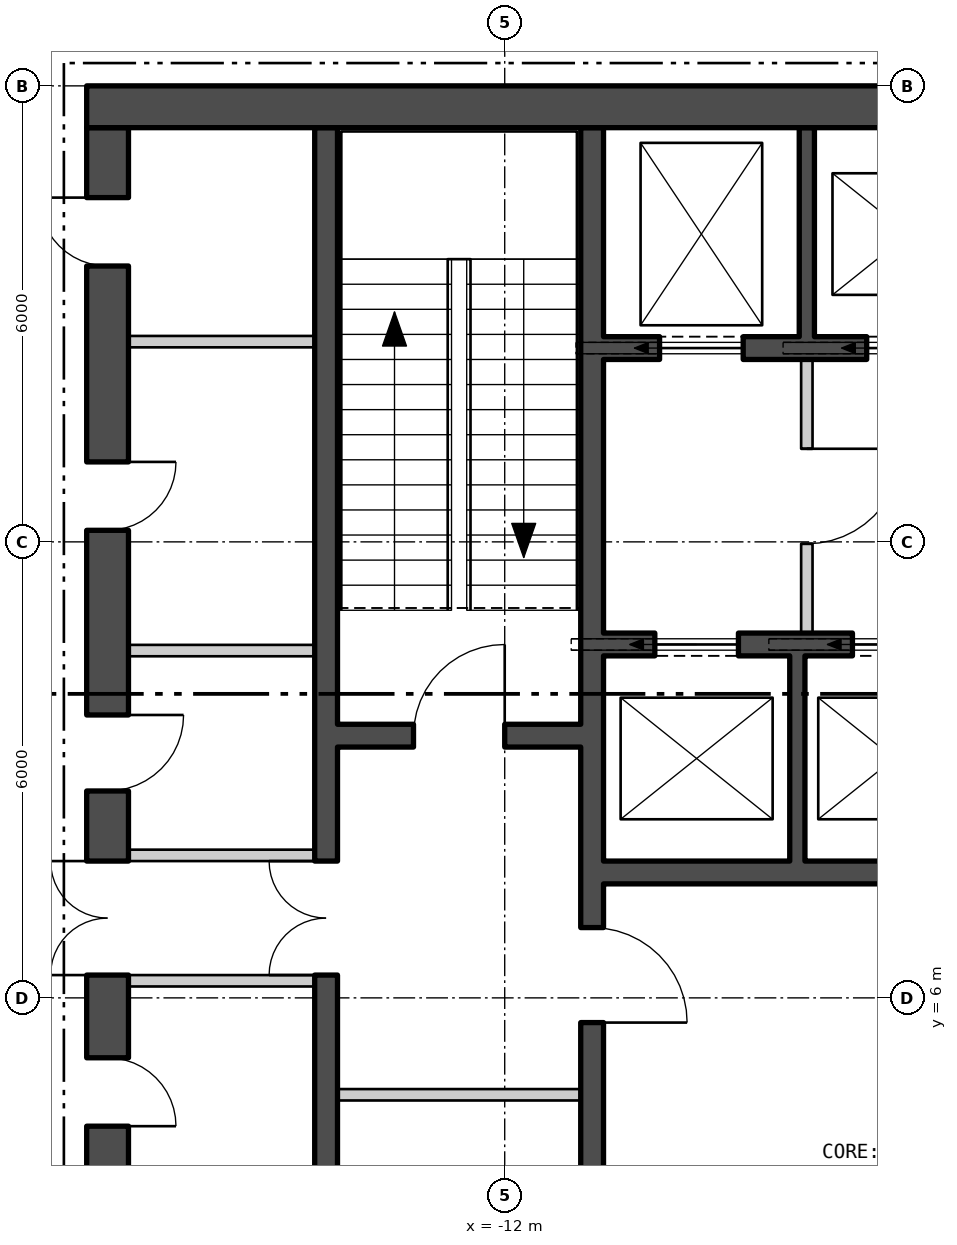
"""IFC4 building model, lengths in metres.
Left out: names, types, materials, properties, quantities, classifications, styles, units other than length and angle.
Written with IfcOpenShell. Run it as: python <this file> out.ifc"""

import sys

from ifc_helpers import new_model, si_unit, direction, frame, frame_2d, origin, place, context, subcontext, project, spatial, polyline, rectangle, outline, extrude, element, fill, save


model = new_model("IFC4")
c1 = context("Model", 3, precision=1e-05, world=origin(), true_north=direction((0.0, 1.0)))
c2 = subcontext(c1, "Body", "Model", "MODEL_VIEW")
j1 = project(units=[si_unit("LENGTHUNIT", "METRE"), si_unit("PLANEANGLEUNIT", "RADIAN")], contexts=[c1])
p1 = place(None, origin())
s1 = spatial("IfcSite", under=j1, at=p1, CompositionType="ELEMENT")
p2 = place(p1, origin())
s2 = spatial("IfcBuilding", under=s1, at=p2, CompositionType="ELEMENT")
p3 = place(p2, frame((0.0, 0.0, 124.8)))
s3 = spatial("IfcBuildingStorey", under=s2, at=p3, CompositionType="ELEMENT", Elevation=124.8)
p4 = place(p3, frame((-27.45, 12.042, -0.18), z_axis=(0.0, 0.0, 1.0), x_axis=(0.500000711659, -0.866024992908, 0.0)))
e1 = element("IfcWall", 1, at=p4, inside=s3, PredefinedType="SOLIDWALL", context=c2, shape_type="SweptSolid", body=[
    extrude(outline(polyline([(-0.13, -0.225), (45.87, -0.225), (45.61, 0.225), (0.13, 0.225), (-0.13, -0.225)])), origin(), (0.0, 0.0, 1.0), 4.28),
])
p5 = place(p4, frame((1.424, 0.0, 1.08)))
e2 = element("IfcOpeningElement", 2, at=p5, cuts=e1, PredefinedType="OPENING", context=c2, shape_type="SweptSolid", body=[
    extrude(rectangle(XDim=2.4, YDim=2.6, at=frame_2d((1.2, 1.3))), frame((0.0, 0.235, 0.0), z_axis=(0.0, -1.0, 0.0), x_axis=(1.0, 0.0, 0.0)), (0.0, 0.0, 1.0), 0.47),
])
p6 = place(p4, frame((5.893, 0.0, 1.08)))
e3 = element("IfcOpeningElement", 3, at=p6, cuts=e1, PredefinedType="OPENING", context=c2, shape_type="SweptSolid", body=[
    extrude(rectangle(XDim=2.4, YDim=2.6, at=frame_2d((1.2, 1.3))), frame((0.0, 0.235, 0.0), z_axis=(0.0, -1.0, 0.0), x_axis=(1.0, 0.0, 0.0)), (0.0, 0.0, 1.0), 0.47),
])
p7 = place(p4, frame((10.401, 0.0, 1.08)))
e4 = element("IfcOpeningElement", 4, at=p7, cuts=e1, PredefinedType="OPENING", context=c2, shape_type="SweptSolid", body=[
    extrude(rectangle(XDim=2.4, YDim=2.6, at=frame_2d((1.2, 1.3))), frame((0.0, 0.235, 0.0), z_axis=(0.0, -1.0, 0.0), x_axis=(1.0, 0.0, 0.0)), (0.0, 0.0, 1.0), 0.47),
])
p8 = place(p4, frame((19.416, 0.0, 1.08)))
e5 = element("IfcOpeningElement", 5, at=p8, cuts=e1, PredefinedType="OPENING", context=c2, shape_type="SweptSolid", body=[
    extrude(rectangle(XDim=2.4, YDim=2.6, at=frame_2d((1.2, 1.3))), frame((0.0, 0.235, 0.0), z_axis=(0.0, -1.0, 0.0), x_axis=(1.0, 0.0, 0.0)), (0.0, 0.0, 1.0), 0.47),
])
p9 = place(p4, frame((23.924, 0.0, 1.08)))
e6 = element("IfcOpeningElement", 6, at=p9, cuts=e1, PredefinedType="OPENING", context=c2, shape_type="SweptSolid", body=[
    extrude(rectangle(XDim=2.4, YDim=2.6, at=frame_2d((1.2, 1.3))), frame((0.0, 0.235, 0.0), z_axis=(0.0, -1.0, 0.0), x_axis=(1.0, 0.0, 0.0)), (0.0, 0.0, 1.0), 0.47),
])
p10 = place(p4, frame((28.431, 0.0, 1.08)))
e7 = element("IfcOpeningElement", 7, at=p10, cuts=e1, PredefinedType="OPENING", context=c2, shape_type="SweptSolid", body=[
    extrude(rectangle(XDim=2.4, YDim=2.6, at=frame_2d((1.2, 1.3))), frame((0.0, 0.235, 0.0), z_axis=(0.0, -1.0, 0.0), x_axis=(1.0, 0.0, 0.0)), (0.0, 0.0, 1.0), 0.47),
])
p11 = place(p4, frame((32.939, 0.0, 1.08)))
e8 = element("IfcOpeningElement", 8, at=p11, cuts=e1, PredefinedType="OPENING", context=c2, shape_type="SweptSolid", body=[
    extrude(rectangle(XDim=2.4, YDim=2.6, at=frame_2d((1.2, 1.3))), frame((0.0, 0.235, 0.0), z_axis=(0.0, -1.0, 0.0), x_axis=(1.0, 0.0, 0.0)), (0.0, 0.0, 1.0), 0.47),
])
p12 = place(p4, frame((37.447, 0.0, 1.08)))
e9 = element("IfcOpeningElement", 9, at=p12, cuts=e1, PredefinedType="OPENING", context=c2, shape_type="SweptSolid", body=[
    extrude(rectangle(XDim=2.4, YDim=2.6, at=frame_2d((1.2, 1.3))), frame((0.0, 0.235, 0.0), z_axis=(0.0, -1.0, 0.0), x_axis=(1.0, 0.0, 0.0)), (0.0, 0.0, 1.0), 0.47),
])
p13 = place(p4, frame((41.916, 0.0, 1.08)))
e10 = element("IfcOpeningElement", 10, at=p13, cuts=e1, PredefinedType="OPENING", context=c2, shape_type="SweptSolid", body=[
    extrude(rectangle(XDim=2.4, YDim=2.6, at=frame_2d((1.2, 1.3))), frame((0.0, 0.235, 0.0), z_axis=(0.0, -1.0, 0.0), x_axis=(1.0, 0.0, 0.0)), (0.0, 0.0, 1.0), 0.47),
])
p14 = place(p3, frame((-17.5, 17.725, 0.0), z_axis=(0.0, 0.0, 1.0), x_axis=(1.0, 0.0, 0.0)))
e11 = element("IfcWall", 11, at=p14, inside=s3, PredefinedType="SHEAR", context=c2, shape_type="SweptSolid", body=[
    extrude(rectangle(XDim=35.0, YDim=0.55, at=frame_2d((17.5, 0.0))), origin(), (0.0, 0.0, 1.0), 4.3),
])
p15 = place(p3, frame((-17.225, 0.55, 0.0), z_axis=(0.0, 0.0, 1.0), x_axis=(0.0, 1.0, 0.0)))
e12 = element("IfcWall", 12, at=p15, inside=s3, PredefinedType="SHEAR", context=c2, shape_type="SweptSolid", body=[
    extrude(rectangle(XDim=16.9, YDim=0.55, at=frame_2d((8.45, 0.0))), origin(), (0.0, 0.0, 1.0), 4.3),
])
p16 = place(p15, frame((5.75, 0.0, 0.0)))
e13 = element("IfcOpeningElement", 13, at=p16, cuts=e12, PredefinedType="OPENING", context=c2, shape_type="SweptSolid", body=[
    extrude(rectangle(XDim=1.5, YDim=2.1, at=frame_2d((0.75, 1.05))), frame((0.0, 0.285, 0.0), z_axis=(0.0, -1.0, 0.0), x_axis=(1.0, 0.0, 0.0)), (0.0, 0.0, 1.0), 0.57),
])
p17 = place(p15, frame((0.887, 0.0, 0.0)))
e14 = element("IfcOpeningElement", 14, at=p17, cuts=e12, PredefinedType="OPENING", context=c2, shape_type="SweptSolid", body=[
    extrude(rectangle(XDim=0.9, YDim=2.1, at=frame_2d((0.45, 1.05))), frame((0.0, 0.285, 0.0), z_axis=(0.0, -1.0, 0.0), x_axis=(1.0, 0.0, 0.0)), (0.0, 0.0, 1.0), 0.57),
])
p18 = place(p15, frame((3.762, 0.0, 0.0)))
e15 = element("IfcOpeningElement", 15, at=p18, cuts=e12, PredefinedType="OPENING", context=c2, shape_type="SweptSolid", body=[
    extrude(rectangle(XDim=0.9, YDim=2.1, at=frame_2d((0.45, 1.05))), frame((0.0, 0.285, 0.0), z_axis=(0.0, -1.0, 0.0), x_axis=(1.0, 0.0, 0.0)), (0.0, 0.0, 1.0), 0.57),
])
p19 = place(p15, frame((8.172, 0.0, 0.0)))
e16 = element("IfcOpeningElement", 16, at=p19, cuts=e12, PredefinedType="OPENING", context=c2, shape_type="SweptSolid", body=[
    extrude(rectangle(XDim=1.0, YDim=2.1, at=frame_2d((0.5, 1.05))), frame((0.0, 0.285, 0.0), z_axis=(0.0, -1.0, 0.0), x_axis=(1.0, 0.0, 0.0)), (0.0, 0.0, 1.0), 0.57),
])
p20 = place(p15, frame((11.602, 0.0, 0.0)))
e17 = element("IfcOpeningElement", 17, at=p20, cuts=e12, PredefinedType="OPENING", context=c2, shape_type="SweptSolid", body=[
    extrude(rectangle(XDim=0.9, YDim=2.1, at=frame_2d((0.45, 1.05))), frame((0.0, 0.285, 0.0), z_axis=(0.0, -1.0, 0.0), x_axis=(1.0, 0.0, 0.0)), (0.0, 0.0, 1.0), 0.57),
])
p21 = place(p15, frame((15.08, 0.0, 0.0)))
e18 = element("IfcOpeningElement", 18, at=p21, cuts=e12, PredefinedType="OPENING", context=c2, shape_type="SweptSolid", body=[
    extrude(rectangle(XDim=0.9, YDim=2.1, at=frame_2d((0.45, 1.05))), frame((0.0, 0.285, 0.0), z_axis=(0.0, -1.0, 0.0), x_axis=(1.0, 0.0, 0.0)), (0.0, 0.0, 1.0), 0.57),
])
p22 = place(p3, frame((-10.85, 0.55, 0.0), z_axis=(0.0, 0.0, 1.0), x_axis=(0.0, 1.0, 0.0)))
e19 = element("IfcWall", 19, at=p22, inside=s3, PredefinedType="SHEAR", context=c2, shape_type="SweptSolid", body=[
    extrude(rectangle(XDim=16.9, YDim=0.3, at=frame_2d((8.45, 0.0))), origin(), (0.0, 0.0, 1.0), 4.3),
])
p23 = place(p22, frame((5.125, 0.0, 0.0)))
e20 = element("IfcOpeningElement", 20, at=p23, cuts=e19, PredefinedType="OPENING", context=c2, shape_type="SweptSolid", body=[
    extrude(rectangle(XDim=1.25, YDim=2.1, at=frame_2d((0.625, 1.05))), frame((0.0, 0.16, 0.0), z_axis=(0.0, -1.0, 0.0), x_axis=(1.0, 0.0, 0.0)), (0.0, 0.0, 1.0), 0.32),
])
p24 = place(p22, frame((1.55, 0.0, 0.0)))
e21 = element("IfcOpeningElement", 21, at=p24, cuts=e19, PredefinedType="OPENING", context=c2, shape_type="SweptSolid", body=[
    extrude(rectangle(XDim=1.0, YDim=2.1, at=frame_2d((0.5, 1.05))), frame((0.0, 0.16, 0.0), z_axis=(0.0, -1.0, 0.0), x_axis=(1.0, 0.0, 0.0)), (0.0, 0.0, 1.0), 0.32),
])
p25 = place(p3, frame((-14.35, 0.55, 0.0), z_axis=(0.0, 0.0, 1.0), x_axis=(0.0, 1.0, 0.0)))
e22 = element("IfcWall", 22, at=p25, inside=s3, PredefinedType="SHEAR", context=c2, shape_type="SweptSolid", body=[
    extrude(rectangle(XDim=16.9, YDim=0.3, at=frame_2d((8.45, 0.0))), origin(), (0.0, 0.0, 1.0), 4.3),
])
p26 = place(p25, frame((5.75, 0.0, 0.0)))
e23 = element("IfcOpeningElement", 23, at=p26, cuts=e22, PredefinedType="OPENING", context=c2, shape_type="SweptSolid", body=[
    extrude(rectangle(XDim=1.5, YDim=2.1, at=frame_2d((0.75, 1.05))), frame((0.0, 0.16, 0.0), z_axis=(0.0, -1.0, 0.0), x_axis=(1.0, 0.0, 0.0)), (0.0, 0.0, 1.0), 0.32),
])
p27 = place(p3, frame((-14.2, 9.45, 0.0), z_axis=(0.0, 0.0, 1.0), x_axis=(1.0, 0.0, 0.0)))
e24 = element("IfcWall", 24, at=p27, inside=s3, PredefinedType="SHEAR", context=c2, shape_type="SweptSolid", body=[
    extrude(rectangle(XDim=3.2, YDim=0.3, at=frame_2d((1.6, 0.0))), origin(), (0.0, 0.0, 1.0), 4.3),
])
p28 = place(p27, frame((1.0, 0.0, 0.0)))
e25 = element("IfcOpeningElement", 25, at=p28, cuts=e24, PredefinedType="OPENING", context=c2, shape_type="SweptSolid", body=[
    extrude(rectangle(XDim=1.2, YDim=2.1, at=frame_2d((0.6, 1.05))), frame((0.0, 0.16, 0.0), z_axis=(0.0, -1.0, 0.0), x_axis=(1.0, 0.0, 0.0)), (0.0, 0.0, 1.0), 0.32),
])
p29 = place(p3, frame((-10.7, 14.55, 0.0), z_axis=(0.0, 0.0, 1.0), x_axis=(1.0, 0.0, 0.0)))
e26 = element("IfcWall", 26, at=p29, inside=s3, PredefinedType="SHEAR", context=c2, shape_type="SweptSolid", body=[
    extrude(rectangle(XDim=21.4, YDim=0.3, at=frame_2d((10.7, 0.0))), origin(), (0.0, 0.0, 1.0), 4.3),
])
p30 = place(p29, frame((0.738, 0.0, 0.0)))
e27 = element("IfcOpeningElement", 27, at=p30, cuts=e26, PredefinedType="OPENING", context=c2, shape_type="SweptSolid", body=[
    extrude(rectangle(XDim=1.1, YDim=2.1, at=frame_2d((0.55, 1.05))), frame((0.0, 0.16, 0.0), z_axis=(0.0, -1.0, 0.0), x_axis=(1.0, 0.0, 0.0)), (0.0, 0.0, 1.0), 0.32),
])
p31 = place(p29, frame((3.462, 0.0, 0.0)))
e28 = element("IfcOpeningElement", 28, at=p31, cuts=e26, PredefinedType="OPENING", context=c2, shape_type="SweptSolid", body=[
    extrude(rectangle(XDim=1.1, YDim=2.1, at=frame_2d((0.55, 1.05))), frame((0.0, 0.16, 0.0), z_axis=(0.0, -1.0, 0.0), x_axis=(1.0, 0.0, 0.0)), (0.0, 0.0, 1.0), 0.32),
])
p32 = place(p29, frame((6.138, 0.0, 0.0)))
e29 = element("IfcOpeningElement", 29, at=p32, cuts=e26, PredefinedType="OPENING", context=c2, shape_type="SweptSolid", body=[
    extrude(rectangle(XDim=1.1, YDim=2.1, at=frame_2d((0.55, 1.05))), frame((0.0, 0.16, 0.0), z_axis=(0.0, -1.0, 0.0), x_axis=(1.0, 0.0, 0.0)), (0.0, 0.0, 1.0), 0.32),
])
p33 = place(p29, frame((8.812, 0.0, 0.0)))
e30 = element("IfcOpeningElement", 30, at=p33, cuts=e26, PredefinedType="OPENING", context=c2, shape_type="SweptSolid", body=[
    extrude(rectangle(XDim=1.1, YDim=2.1, at=frame_2d((0.55, 1.05))), frame((0.0, 0.16, 0.0), z_axis=(0.0, -1.0, 0.0), x_axis=(1.0, 0.0, 0.0)), (0.0, 0.0, 1.0), 0.32),
])
p34 = place(p29, frame((14.162, 0.0, 0.0)))
e31 = element("IfcOpeningElement", 31, at=p34, cuts=e26, PredefinedType="OPENING", context=c2, shape_type="SweptSolid", body=[
    extrude(rectangle(XDim=1.1, YDim=2.1, at=frame_2d((0.55, 1.05))), frame((0.0, 0.16, 0.0), z_axis=(0.0, -1.0, 0.0), x_axis=(1.0, 0.0, 0.0)), (0.0, 0.0, 1.0), 0.32),
])
p35 = place(p29, frame((16.837, 0.0, 0.0)))
e32 = element("IfcOpeningElement", 32, at=p35, cuts=e26, PredefinedType="OPENING", context=c2, shape_type="SweptSolid", body=[
    extrude(rectangle(XDim=1.1, YDim=2.1, at=frame_2d((0.55, 1.05))), frame((0.0, 0.16, 0.0), z_axis=(0.0, -1.0, 0.0), x_axis=(1.0, 0.0, 0.0)), (0.0, 0.0, 1.0), 0.32),
])
p36 = place(p29, frame((19.562, 0.0, 0.0)))
e33 = element("IfcOpeningElement", 33, at=p36, cuts=e26, PredefinedType="OPENING", context=c2, shape_type="SweptSolid", body=[
    extrude(rectangle(XDim=1.1, YDim=2.1, at=frame_2d((0.55, 1.05))), frame((0.0, 0.16, 0.0), z_axis=(0.0, -1.0, 0.0), x_axis=(1.0, 0.0, 0.0)), (0.0, 0.0, 1.0), 0.32),
])
p37 = place(p3, frame((-10.7, 10.65, 0.0), z_axis=(0.0, 0.0, 1.0), x_axis=(1.0, 0.0, 0.0)))
e34 = element("IfcWall", 34, at=p37, inside=s3, PredefinedType="SHEAR", context=c2, shape_type="SweptSolid", body=[
    extrude(rectangle(XDim=10.3, YDim=0.3, at=frame_2d((5.15, 0.0))), origin(), (0.0, 0.0, 1.0), 4.3),
])
p38 = place(p37, frame((0.675, 0.0, 0.0)))
e35 = element("IfcOpeningElement", 35, at=p38, cuts=e34, PredefinedType="OPENING", context=c2, shape_type="SweptSolid", body=[
    extrude(rectangle(XDim=1.1, YDim=2.1, at=frame_2d((0.55, 1.05))), frame((0.0, 0.16, 0.0), z_axis=(0.0, -1.0, 0.0), x_axis=(1.0, 0.0, 0.0)), (0.0, 0.0, 1.0), 0.32),
])
p39 = place(p37, frame((3.275, 0.0, 0.0)))
e36 = element("IfcOpeningElement", 36, at=p39, cuts=e34, PredefinedType="OPENING", context=c2, shape_type="SweptSolid", body=[
    extrude(rectangle(XDim=1.1, YDim=2.1, at=frame_2d((0.55, 1.05))), frame((0.0, 0.16, 0.0), z_axis=(0.0, -1.0, 0.0), x_axis=(1.0, 0.0, 0.0)), (0.0, 0.0, 1.0), 0.32),
])
p40 = place(p37, frame((5.825, 0.0, 0.0)))
e37 = element("IfcOpeningElement", 37, at=p40, cuts=e34, PredefinedType="OPENING", context=c2, shape_type="SweptSolid", body=[
    extrude(rectangle(XDim=1.1, YDim=2.1, at=frame_2d((0.55, 1.05))), frame((0.0, 0.16, 0.0), z_axis=(0.0, -1.0, 0.0), x_axis=(1.0, 0.0, 0.0)), (0.0, 0.0, 1.0), 0.32),
])
p41 = place(p37, frame((8.375, 0.0, 0.0)))
e38 = element("IfcOpeningElement", 38, at=p41, cuts=e34, PredefinedType="OPENING", context=c2, shape_type="SweptSolid", body=[
    extrude(rectangle(XDim=1.1, YDim=2.1, at=frame_2d((0.55, 1.05))), frame((0.0, 0.16, 0.0), z_axis=(0.0, -1.0, 0.0), x_axis=(1.0, 0.0, 0.0)), (0.0, 0.0, 1.0), 0.32),
])
p42 = place(p3, frame((-10.7, 7.65, 0.0), z_axis=(0.0, 0.0, 1.0), x_axis=(1.0, 0.0, 0.0)))
e39 = element("IfcWall", 39, at=p42, inside=s3, PredefinedType="SHEAR", context=c2, shape_type="SweptSolid", body=[
    extrude(rectangle(XDim=10.3, YDim=0.3, at=frame_2d((5.15, 0.0))), origin(), (0.0, 0.0, 1.0), 4.3),
])
p43 = place(p3, frame((-8.025, 14.7, 0.0), z_axis=(0.0, 0.0, 1.0), x_axis=(0.0, 1.0, 0.0)))
e40 = element("IfcWall", 40, at=p43, inside=s3, PredefinedType="SHEAR", context=c2, shape_type="SweptSolid", body=[
    extrude(rectangle(XDim=2.75, YDim=0.2, at=frame_2d((1.375, 0.0))), origin(), (0.0, 0.0, 1.0), 4.3),
])
p44 = place(p3, frame((-8.15, 7.8, 0.0), z_axis=(0.0, 0.0, 1.0), x_axis=(0.0, 1.0, 0.0)))
e41 = element("IfcWall", 41, at=p44, inside=s3, PredefinedType="SHEAR", context=c2, shape_type="SweptSolid", body=[
    extrude(rectangle(XDim=2.7, YDim=0.2, at=frame_2d((1.35, 0.0))), origin(), (0.0, 0.0, 1.0), 4.3),
])
p45 = place(p3, frame((-8.025, 10.8, 0.0), z_axis=(0.0, 0.0, 1.0), x_axis=(0.0, 1.0, 0.0)))
e42 = element("IfcWall", 42, at=p45, inside=s3, PredefinedType="PARTITIONING", context=c2, shape_type="SweptSolid", body=[
    extrude(rectangle(XDim=3.6, YDim=0.15, at=frame_2d((1.8, 0.0))), origin(), (0.0, 0.0, 1.0), 4.3),
])
p46 = place(p45, frame((1.175, 0.0, 0.0)))
e43 = element("IfcOpeningElement", 43, at=p46, cuts=e42, PredefinedType="OPENING", context=c2, shape_type="SweptSolid", body=[
    extrude(rectangle(XDim=1.25, YDim=2.1, at=frame_2d((0.625, 1.05))), frame((0.0, 0.085, 0.0), z_axis=(0.0, -1.0, 0.0), x_axis=(1.0, 0.0, 0.0)), (0.0, 0.0, 1.0), 0.17),
])
p47 = place(p3, frame((-14.2, 4.725, 0.0), z_axis=(0.0, 0.0, 1.0), x_axis=(1.0, 0.0, 0.0)))
e44 = element("IfcWall", 44, at=p47, inside=s3, PredefinedType="PARTITIONING", context=c2, shape_type="SweptSolid", body=[
    extrude(rectangle(XDim=3.2, YDim=0.15, at=frame_2d((1.6, 0.0))), origin(), (0.0, 0.0, 1.0), 4.3),
])
for number, where, z_axis, x_axis in (
    (45, (-16.95, 6.225, 0.0), (0.0, 0.0, 1.0), (1.0, 0.0, 0.0)),
    (46, (-16.95, 7.875, 0.0), (0.0, 0.0, 1.0), (1.0, 0.0, 0.0)),
    (47, (-16.95, 10.57, 0.0), (0.0, 0.0, 1.0), (1.0, 0.0, 0.0)),
    (48, (-16.95, 14.635, 0.0), (0.0, 0.0, 1.0), (1.0, 0.0, 0.0)),
):
    element("IfcWall", number, at=place(p3, frame(where, z_axis=z_axis, x_axis=x_axis)), inside=s3, PredefinedType="PARTITIONING", context=c2, shape_type="SweptSolid", body=[
        extrude(rectangle(XDim=2.45, YDim=0.15, at=frame_2d((1.225, 0.0))), origin(), (0.0, 0.0, 1.0), 4.3),
    ])
p48 = place(p30, origin())
e49 = element("IfcDoor", 49, at=p48, inside=s3, OperationType="SLIDING_TO_LEFT", PredefinedType="DOOR", context=c2, shape_type="SweptSolid", body=[
    extrude(rectangle(XDim=1.1, YDim=2.1, at=frame_2d((0.55, 1.05))), frame((0.0, 0.025, 0.0), z_axis=(0.0, -1.0, 0.0), x_axis=(1.0, 0.0, 0.0)), (0.0, 0.0, 1.0), 0.05),
])
fill(e27, e49)
p49 = place(p31, origin())
e50 = element("IfcDoor", 50, at=p49, inside=s3, OperationType="SLIDING_TO_LEFT", PredefinedType="DOOR", context=c2, shape_type="SweptSolid", body=[
    extrude(rectangle(XDim=1.1, YDim=2.1, at=frame_2d((0.55, 1.05))), frame((0.0, 0.025, 0.0), z_axis=(0.0, -1.0, 0.0), x_axis=(1.0, 0.0, 0.0)), (0.0, 0.0, 1.0), 0.05),
])
fill(e28, e50)
p50 = place(p38, origin())
e51 = element("IfcDoor", 51, at=p50, inside=s3, OperationType="SLIDING_TO_LEFT", PredefinedType="DOOR", context=c2, shape_type="SweptSolid", body=[
    extrude(rectangle(XDim=1.1, YDim=2.1, at=frame_2d((0.55, 1.05))), frame((0.0, 0.025, 0.0), z_axis=(0.0, -1.0, 0.0), x_axis=(1.0, 0.0, 0.0)), (0.0, 0.0, 1.0), 0.05),
])
fill(e35, e51)
p51 = place(p39, origin())
e52 = element("IfcDoor", 52, at=p51, inside=s3, OperationType="SLIDING_TO_LEFT", PredefinedType="DOOR", context=c2, shape_type="SweptSolid", body=[
    extrude(rectangle(XDim=1.1, YDim=2.1, at=frame_2d((0.55, 1.05))), frame((0.0, 0.025, 0.0), z_axis=(0.0, -1.0, 0.0), x_axis=(1.0, 0.0, 0.0)), (0.0, 0.0, 1.0), 0.05),
])
fill(e36, e52)
p52 = place(p46, origin())
e53 = element("IfcDoor", 53, at=p52, inside=s3, OperationType="SINGLE_SWING_RIGHT", PredefinedType="DOOR", context=c2, shape_type="SweptSolid", body=[
    extrude(rectangle(XDim=1.25, YDim=2.1, at=frame_2d((0.625, 1.05))), frame((0.0, 0.025, 0.0), z_axis=(0.0, -1.0, 0.0), x_axis=(1.0, 0.0, 0.0)), (0.0, 0.0, 1.0), 0.05),
])
fill(e43, e53)
p53 = place(p28, origin())
e54 = element("IfcDoor", 54, at=p53, inside=s3, OperationType="SINGLE_SWING_LEFT", PredefinedType="DOOR", context=c2, shape_type="SweptSolid", body=[
    extrude(rectangle(XDim=1.2, YDim=2.1, at=frame_2d((0.6, 1.05))), frame((0.0, 0.025, 0.0), z_axis=(0.0, -1.0, 0.0), x_axis=(1.0, 0.0, 0.0)), (0.0, 0.0, 1.0), 0.05),
])
fill(e25, e54)
p54 = place(p23, origin())
e55 = element("IfcDoor", 55, at=p54, inside=s3, OperationType="SINGLE_SWING_LEFT", PredefinedType="DOOR", context=c2, shape_type="SweptSolid", body=[
    extrude(rectangle(XDim=1.25, YDim=2.1, at=frame_2d((0.625, 1.05))), frame((0.0, 0.025, 0.0), z_axis=(0.0, -1.0, 0.0), x_axis=(1.0, 0.0, 0.0)), (0.0, 0.0, 1.0), 0.05),
])
fill(e20, e55)
p55 = place(p26, origin())
e56 = element("IfcDoor", 56, at=p55, inside=s3, OperationType="DOUBLE_DOOR_SINGLE_SWING", PredefinedType="DOOR", context=c2, shape_type="SweptSolid", body=[
    extrude(rectangle(XDim=1.5, YDim=2.1, at=frame_2d((0.75, 1.05))), frame((0.0, 0.025, 0.0), z_axis=(0.0, -1.0, 0.0), x_axis=(1.0, 0.0, 0.0)), (0.0, 0.0, 1.0), 0.05),
])
fill(e23, e56)
p56 = place(p16, origin())
e57 = element("IfcDoor", 57, at=p56, inside=s3, OperationType="DOUBLE_DOOR_SINGLE_SWING", PredefinedType="DOOR", context=c2, shape_type="SweptSolid", body=[
    extrude(rectangle(XDim=1.5, YDim=2.1, at=frame_2d((0.75, 1.05))), frame((0.0, 0.025, 0.0), z_axis=(0.0, -1.0, 0.0), x_axis=(1.0, 0.0, 0.0)), (0.0, 0.0, 1.0), 0.05),
])
fill(e13, e57)
p57 = place(p18, origin())
e58 = element("IfcDoor", 58, at=p57, inside=s3, OperationType="SINGLE_SWING_LEFT", PredefinedType="DOOR", context=c2, shape_type="SweptSolid", body=[
    extrude(rectangle(XDim=0.9, YDim=2.1, at=frame_2d((0.45, 1.05))), frame((0.0, 0.025, 0.0), z_axis=(0.0, -1.0, 0.0), x_axis=(1.0, 0.0, 0.0)), (0.0, 0.0, 1.0), 0.05),
])
fill(e15, e58)
p58 = place(p19, origin())
e59 = element("IfcDoor", 59, at=p58, inside=s3, OperationType="SINGLE_SWING_RIGHT", PredefinedType="DOOR", context=c2, shape_type="SweptSolid", body=[
    extrude(rectangle(XDim=1.0, YDim=2.1, at=frame_2d((0.5, 1.05))), frame((0.0, 0.025, 0.0), z_axis=(0.0, -1.0, 0.0), x_axis=(1.0, 0.0, 0.0)), (0.0, 0.0, 1.0), 0.05),
])
fill(e16, e59)
p59 = place(p20, origin())
e60 = element("IfcDoor", 60, at=p59, inside=s3, OperationType="SINGLE_SWING_RIGHT", PredefinedType="DOOR", context=c2, shape_type="SweptSolid", body=[
    extrude(rectangle(XDim=0.9, YDim=2.1, at=frame_2d((0.45, 1.05))), frame((0.0, 0.025, 0.0), z_axis=(0.0, -1.0, 0.0), x_axis=(1.0, 0.0, 0.0)), (0.0, 0.0, 1.0), 0.05),
])
fill(e17, e60)
p60 = place(p21, origin())
e61 = element("IfcDoor", 61, at=p60, inside=s3, OperationType="SINGLE_SWING_LEFT", PredefinedType="DOOR", context=c2, shape_type="SweptSolid", body=[
    extrude(rectangle(XDim=0.9, YDim=2.1, at=frame_2d((0.45, 1.05))), frame((0.0, 0.025, 0.0), z_axis=(0.0, -1.0, 0.0), x_axis=(1.0, 0.0, 0.0)), (0.0, 0.0, 1.0), 0.05),
])
fill(e18, e61)
save(model, sys.argv[1])
